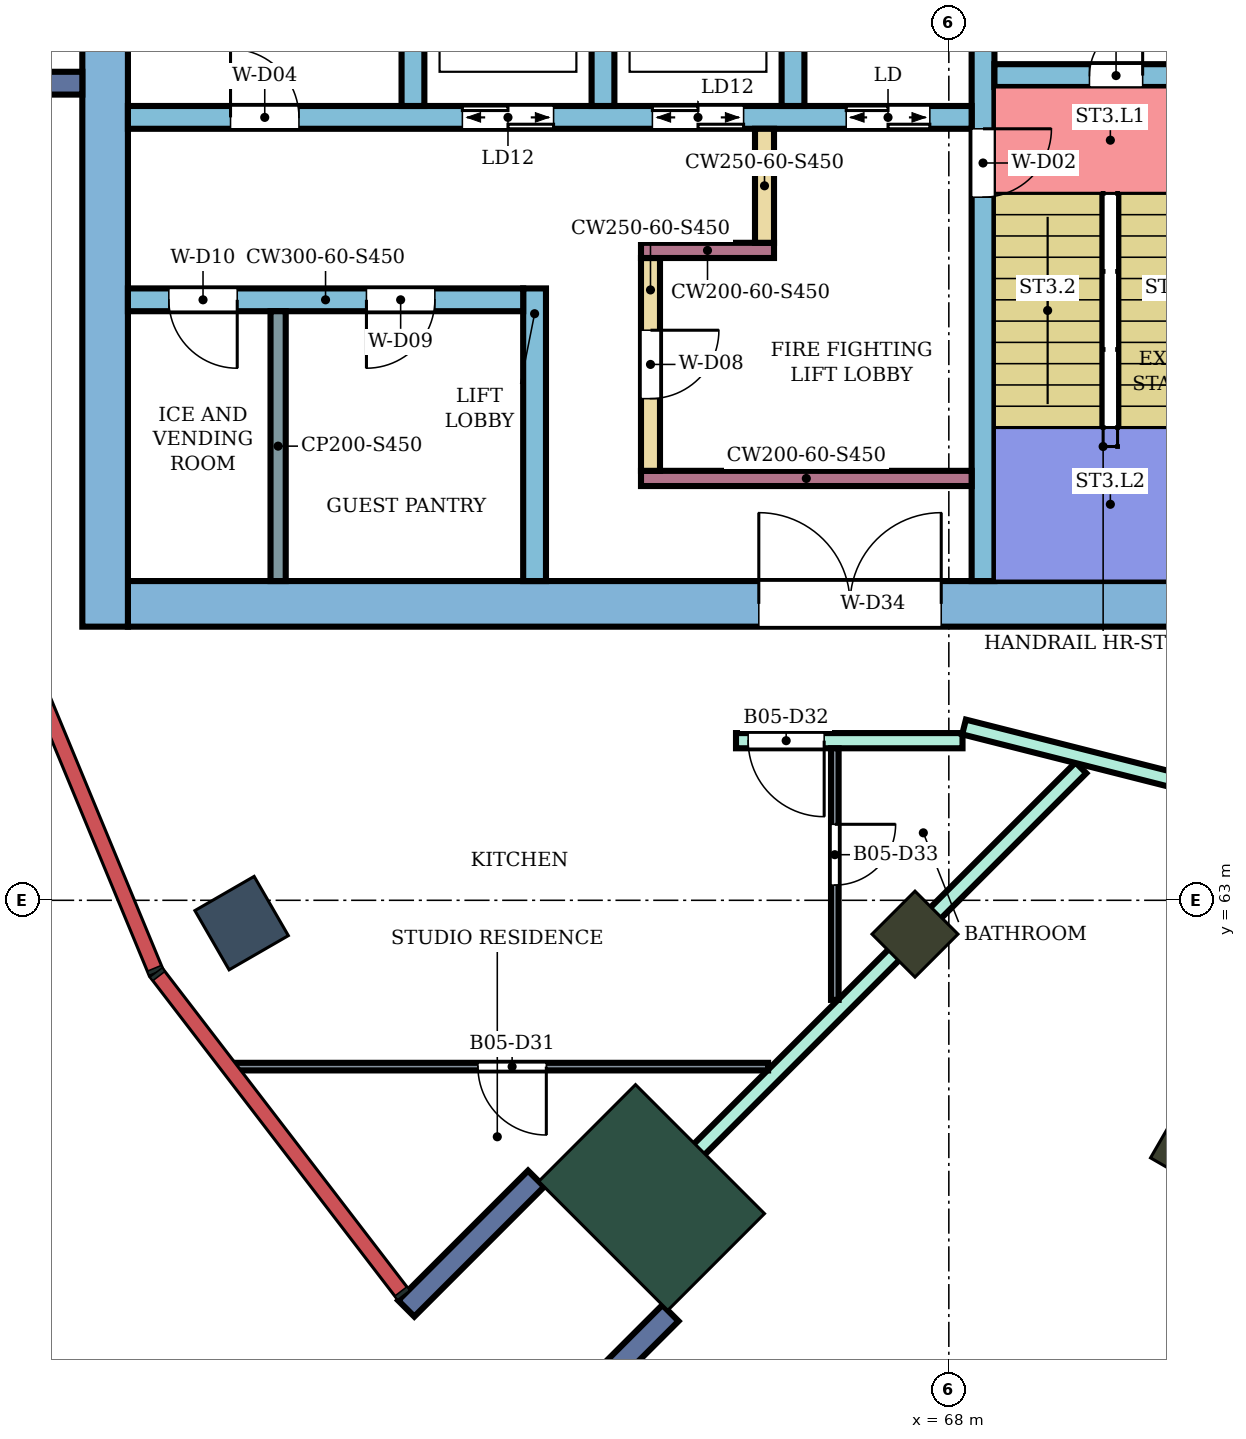
"""IFC4 building model, lengths in metres.
Left out: names, types, materials, properties, quantities, classifications, styles, units other than length and angle.
Written with IfcOpenShell. Run it as: python <this file> out.ifc"""

import sys

from ifc_helpers import new_model, si_unit, direction, frame, frame_2d, origin, origin_2d, place, context, subcontext, project, spatial, rectangle, extrude, element, fill, save


model = new_model("IFC4")
c1 = context("Model", 3, precision=1e-05, world=origin(), true_north=direction((0.0, 1.0)))
c2 = subcontext(c1, "Body", "Model", "MODEL_VIEW")
j1 = project(units=[si_unit("LENGTHUNIT", "METRE"), si_unit("PLANEANGLEUNIT", "RADIAN")], contexts=[c1])
p1 = place(None, origin())
s1 = spatial("IfcSite", under=j1, at=p1, CompositionType="ELEMENT")
p2 = place(p1, origin())
s2 = spatial("IfcBuilding", under=s1, at=p2, CompositionType="ELEMENT")
p3 = place(p2, frame((0.0, 0.0, 266.7)))
s3 = spatial("IfcBuildingStorey", under=s2, at=p3, CompositionType="ELEMENT", Elevation=266.7)
p4 = place(p3, frame((58.696, 62.7, 0.0), z_axis=(0.0, 0.0, 1.0), x_axis=(-0.866025403784, -0.5, 0.0)))
e1 = element("IfcColumn", 1, at=p4, inside=s3, PredefinedType="COLUMN", context=c2, shape_type="SweptSolid", body=[
    extrude(rectangle(XDim=0.9, YDim=0.9, at=origin_2d()), origin(), (0.0, 0.0, 1.0), 4.2),
])
for number, where, z_axis, x_axis in (
    (2, (67.555, 62.555, 0.0), (0.0, 0.0, 1.0), (-0.707, -0.707, 0.0)),
    (3, (71.2, 59.758, 0.0), (0.0, 0.0, 1.0), (-0.5, -0.866, 0.0)),
):
    element("IfcColumn", number, at=place(p3, frame(where, z_axis=z_axis, x_axis=x_axis)), inside=s3, PredefinedType="COLUMN", context=c2, shape_type="SweptSolid", body=[
        extrude(rectangle(XDim=0.8, YDim=0.8, at=origin_2d()), origin(), (0.0, 0.0, 1.0), 4.2),
    ])
p5 = place(p3, frame((64.09, 59.09, 0.0), z_axis=(0.0, 0.0, 1.0), x_axis=(-0.707106781187, -0.707106781187, 0.0)))
e4 = element("IfcColumn", 4, at=p5, inside=s3, PredefinedType="COLUMN", context=c2, shape_type="SweptSolid", body=[
    extrude(rectangle(XDim=1.8, YDim=2.4, at=origin_2d()), origin(), (0.0, 0.0, 1.0), 4.2),
])
p6 = place(p3, frame((72.1, 66.9, 0.0), z_axis=(0.0, 0.0, 1.0), x_axis=(-1.0, 0.0, 0.0)))
e5 = element("IfcWall", 5, at=p6, inside=s3, PredefinedType="SHEAR", context=c2, shape_type="SweptSolid", body=[
    extrude(rectangle(XDim=14.9, YDim=0.6, at=frame_2d((7.45, 0.0))), origin(), (0.0, 0.0, 1.0), 3.75),
])
p7 = place(p6, frame((4.2, 0.0, 0.0)))
e6 = element("IfcOpeningElement", 6, at=p7, cuts=e5, PredefinedType="OPENING", context=c2, shape_type="SweptSolid", body=[
    extrude(rectangle(XDim=2.4, YDim=2.4, at=frame_2d((1.2, 1.2))), frame((0.0, 0.31, 0.0), z_axis=(0.0, -1.0, 0.0), x_axis=(1.0, 0.0, 0.0)), (0.0, 0.0, 1.0), 0.62),
])
p8 = place(p3, frame((56.9, 83.4, 0.0), z_axis=(0.0, 0.0, 1.0), x_axis=(0.0, -1.0, 0.0)))
e7 = element("IfcWall", 7, at=p8, inside=s3, PredefinedType="SHEAR", context=c2, shape_type="SweptSolid", body=[
    extrude(rectangle(XDim=16.8, YDim=0.6, at=frame_2d((8.4, 0.0))), origin(), (0.0, 0.0, 1.0), 3.75),
])
p9 = place(p3, frame((68.45, 75.0, 0.0), z_axis=(0.0, 0.0, 1.0), x_axis=(0.0, -1.0, 0.0)))
e8 = element("IfcWall", 8, at=p9, inside=s3, PredefinedType="SHEAR", context=c2, shape_type="SweptSolid", body=[
    extrude(rectangle(XDim=7.8, YDim=0.3, at=frame_2d((3.9, 0.0))), origin(), (0.0, 0.0, 1.0), 3.75),
])
p10 = place(p9, frame((1.85, 0.0, 0.0)))
e9 = element("IfcOpeningElement", 9, at=p10, cuts=e8, PredefinedType="OPENING", context=c2, shape_type="SweptSolid", body=[
    extrude(rectangle(XDim=0.9, YDim=2.1, at=frame_2d((0.45, 1.05))), frame((0.0, 0.16, 0.0), z_axis=(0.0, -1.0, 0.0), x_axis=(1.0, 0.0, 0.0)), (0.0, 0.0, 1.0), 0.32),
])
p11 = place(p3, frame((71.65, 73.85, 0.0), z_axis=(0.0, 0.0, 1.0), x_axis=(-1.0, 0.0, 0.0)))
e10 = element("IfcWall", 10, at=p11, inside=s3, PredefinedType="SHEAR", context=c2, shape_type="SweptSolid", body=[
    extrude(rectangle(XDim=3.05, YDim=0.3, at=frame_2d((1.525, 0.0))), origin(), (0.0, 0.0, 1.0), 3.75),
])
p12 = place(p11, frame((1.1, 0.0, 0.0)))
e11 = element("IfcOpeningElement", 11, at=p12, cuts=e10, PredefinedType="OPENING", context=c2, shape_type="SweptSolid", body=[
    extrude(rectangle(XDim=0.7, YDim=2.0, at=frame_2d((0.35, 1.0))), frame((0.0, 0.16, 0.0), z_axis=(0.0, -1.0, 0.0), x_axis=(1.0, 0.0, 0.0)), (0.0, 0.0, 1.0), 0.32),
])
p13 = place(p3, frame((68.3, 73.3, 0.0), z_axis=(0.0, 0.0, 1.0), x_axis=(-1.0, 0.0, 0.0)))
e12 = element("IfcWall", 12, at=p13, inside=s3, PredefinedType="SHEAR", context=c2, shape_type="SweptSolid", body=[
    extrude(rectangle(XDim=11.1, YDim=0.3, at=frame_2d((5.55, 0.0))), origin(), (0.0, 0.0, 1.0), 3.75),
])
p14 = place(p13, frame((0.55, 0.0, 0.0)))
e13 = element("IfcOpeningElement", 13, at=p14, cuts=e12, PredefinedType="OPENING", context=c2, shape_type="SweptSolid", body=[
    extrude(rectangle(XDim=1.1, YDim=2.1, at=frame_2d((0.55, 1.05))), frame((0.0, 0.16, 0.0), z_axis=(0.0, -1.0, 0.0), x_axis=(1.0, 0.0, 0.0)), (0.0, 0.0, 1.0), 0.32),
])
p15 = place(p13, frame((3.0, 0.0, 0.0)))
e14 = element("IfcOpeningElement", 14, at=p15, cuts=e12, PredefinedType="OPENING", context=c2, shape_type="SweptSolid", body=[
    extrude(rectangle(XDim=1.2, YDim=2.1, at=frame_2d((0.6, 1.05))), frame((0.0, 0.16, 0.0), z_axis=(0.0, -1.0, 0.0), x_axis=(1.0, 0.0, 0.0)), (0.0, 0.0, 1.0), 0.32),
])
p16 = place(p13, frame((5.5, 0.0, 0.0)))
e15 = element("IfcOpeningElement", 15, at=p16, cuts=e12, PredefinedType="OPENING", context=c2, shape_type="SweptSolid", body=[
    extrude(rectangle(XDim=1.2, YDim=2.1, at=frame_2d((0.6, 1.05))), frame((0.0, 0.16, 0.0), z_axis=(0.0, -1.0, 0.0), x_axis=(1.0, 0.0, 0.0)), (0.0, 0.0, 1.0), 0.32),
])
p17 = place(p13, frame((8.85, 0.0, 0.0)))
e16 = element("IfcOpeningElement", 16, at=p17, cuts=e12, PredefinedType="OPENING", context=c2, shape_type="SweptSolid", body=[
    extrude(rectangle(XDim=0.9, YDim=2.1, at=frame_2d((0.45, 1.05))), frame((0.0, 0.16, 0.0), z_axis=(0.0, -1.0, 0.0), x_axis=(1.0, 0.0, 0.0)), (0.0, 0.0, 1.0), 0.32),
])
for number, where, z_axis, x_axis in (
    (17, (65.95, 76.0, 0.0), (0.0, 0.0, 1.0), (0.0, -1.0, 0.0)),
    (18, (63.45, 76.0, 0.0), (0.0, 0.0, 1.0), (0.0, -1.0, 0.0)),
    (19, (60.95, 76.0, 0.0), (0.0, 0.0, 1.0), (0.0, -1.0, 0.0)),
):
    element("IfcWall", number, at=place(p3, frame(where, z_axis=z_axis, x_axis=x_axis)), inside=s3, PredefinedType="SHEAR", context=c2, shape_type="SweptSolid", body=[
        extrude(rectangle(XDim=2.55, YDim=0.3, at=frame_2d((1.275, 0.0))), origin(), (0.0, 0.0, 1.0), 3.75),
    ])
p18 = place(p3, frame((68.3, 68.55, 0.0), z_axis=(0.0, 0.0, 1.0), x_axis=(-1.0, 0.0, 0.0)))
e20 = element("IfcWall", 20, at=p18, inside=s3, PredefinedType="SHEAR", context=c2, shape_type="SweptSolid", body=[
    extrude(rectangle(XDim=4.35, YDim=0.2, at=frame_2d((2.175, 0.0))), origin(), (0.0, 0.0, 1.0), 3.75),
])
p19 = place(p3, frame((64.075, 71.45, 0.0), z_axis=(0.0, 0.0, 1.0), x_axis=(0.0, -1.0, 0.0)))
e21 = element("IfcWall", 21, at=p19, inside=s3, PredefinedType="SHEAR", context=c2, shape_type="SweptSolid", body=[
    extrude(rectangle(XDim=2.8, YDim=0.25, at=frame_2d((1.4, 0.0))), origin(), (0.0, 0.0, 1.0), 3.75),
])
p20 = place(p19, frame((0.95, 0.0, 0.0)))
e22 = element("IfcOpeningElement", 22, at=p20, cuts=e21, PredefinedType="OPENING", context=c2, shape_type="SweptSolid", body=[
    extrude(rectangle(XDim=0.9, YDim=2.1, at=frame_2d((0.45, 1.05))), frame((0.0, 0.135, 0.0), z_axis=(0.0, -1.0, 0.0), x_axis=(1.0, 0.0, 0.0)), (0.0, 0.0, 1.0), 0.27),
])
p21 = place(p3, frame((65.7, 71.55, 0.0), z_axis=(0.0, 0.0, 1.0), x_axis=(-1.0, 0.0, 0.0)))
e23 = element("IfcWall", 23, at=p21, inside=s3, PredefinedType="SHEAR", context=c2, shape_type="SweptSolid", body=[
    extrude(rectangle(XDim=1.75, YDim=0.2, at=frame_2d((0.875, 0.0))), origin(), (0.0, 0.0, 1.0), 3.75),
])
p22 = place(p3, frame((65.575, 73.15, 0.0), z_axis=(0.0, 0.0, 1.0), x_axis=(0.0, -1.0, 0.0)))
e24 = element("IfcWall", 24, at=p22, inside=s3, PredefinedType="SHEAR", context=c2, shape_type="SweptSolid", body=[
    extrude(rectangle(XDim=1.5, YDim=0.25, at=frame_2d((0.75, 0.0))), origin(), (0.0, 0.0, 1.0), 3.75),
])
p23 = place(p3, frame((62.55, 71.05, 0.0), z_axis=(0.0, 0.0, 1.0), x_axis=(0.0, -1.0, 0.0)))
e25 = element("IfcWall", 25, at=p23, inside=s3, PredefinedType="SHEAR", context=c2, shape_type="SweptSolid", body=[
    extrude(rectangle(XDim=3.85, YDim=0.3, at=frame_2d((1.925, 0.0))), origin(), (0.0, 0.0, 1.0), 3.75),
])
p24 = place(p3, frame((62.4, 70.9, 0.0), z_axis=(0.0, 0.0, 1.0), x_axis=(-1.0, 0.0, 0.0)))
e26 = element("IfcWall", 26, at=p24, inside=s3, PredefinedType="SHEAR", context=c2, shape_type="SweptSolid", body=[
    extrude(rectangle(XDim=5.2, YDim=0.3, at=frame_2d((2.6, 0.0))), origin(), (0.0, 0.0, 1.0), 3.75),
])
p25 = place(p24, frame((1.162, 0.0, 0.0)))
e27 = element("IfcOpeningElement", 27, at=p25, cuts=e26, PredefinedType="OPENING", context=c2, shape_type="SweptSolid", body=[
    extrude(rectangle(XDim=0.9, YDim=2.1, at=frame_2d((0.45, 1.05))), frame((0.0, 0.16, 0.0), z_axis=(0.0, -1.0, 0.0), x_axis=(1.0, 0.0, 0.0)), (0.0, 0.0, 1.0), 0.32),
])
p26 = place(p24, frame((3.762, 0.0, 0.0)))
e28 = element("IfcOpeningElement", 28, at=p26, cuts=e26, PredefinedType="OPENING", context=c2, shape_type="SweptSolid", body=[
    extrude(rectangle(XDim=0.9, YDim=2.1, at=frame_2d((0.45, 1.05))), frame((0.0, 0.16, 0.0), z_axis=(0.0, -1.0, 0.0), x_axis=(1.0, 0.0, 0.0)), (0.0, 0.0, 1.0), 0.32),
])
for number, where, z_axis, x_axis in (
    (29, (56.6, 73.75, 0.0), (0.0, 0.0, 1.0), (-1.0, 0.0, 0.0)),
    (30, (62.57, 59.338, 0.0), (0.0, 0.0, 1.0), (-0.707, -0.707, 0.0)),
    (31, (64.338, 57.57, 0.0), (0.0, 0.0, 1.0), (-0.707, -0.707, 0.0)),
):
    element("IfcWall", number, at=place(p3, frame(where, z_axis=z_axis, x_axis=x_axis)), inside=s3, PredefinedType="NOTDEFINED", context=c2, shape_type="SweptSolid", body=[
        extrude(rectangle(XDim=2.416, YDim=0.3, at=frame_2d((1.208, 0.0))), origin(), (0.0, 0.0, 1.0), 4.2),
    ])
p27 = place(p3, frame((63.592, 58.6, 0.0), z_axis=(0.0, 0.0, 1.0), x_axis=(0.707261286313, 0.706952242293, 0.0)))
e32 = element("IfcWall", 32, at=p27, inside=s3, PredefinedType="PARTITIONING", context=c2, shape_type="SweptSolid", body=[
    extrude(rectangle(XDim=8.69, YDim=0.2, at=frame_2d((4.345, 0.0))), origin(), (0.0, 0.0, 1.0), 3.75),
])
p28 = place(p3, frame((65.2, 65.1, 0.0), z_axis=(0.0, 0.0, 1.0), x_axis=(1.0, 0.0, 0.0)))
e33 = element("IfcWall", 33, at=p28, inside=s3, PredefinedType="PARTITIONING", context=c2, shape_type="SweptSolid", body=[
    extrude(rectangle(XDim=2.98, YDim=0.2, at=frame_2d((1.49, 0.0))), origin(), (0.0, 0.0, 1.0), 3.75),
])
p29 = place(p28, frame((0.16, 0.0, 0.0)))
e34 = element("IfcOpeningElement", 34, at=p29, cuts=e33, PredefinedType="OPENING", context=c2, shape_type="SweptSolid", body=[
    extrude(rectangle(XDim=1.0, YDim=2.1, at=frame_2d((0.5, 1.05))), frame((0.0, 0.11, 0.0), z_axis=(0.0, -1.0, 0.0), x_axis=(1.0, 0.0, 0.0)), (0.0, 0.0, 1.0), 0.22),
])
p30 = place(p3, frame((68.2, 65.28, 0.0), z_axis=(0.0, 0.0, 1.0), x_axis=(0.969428528216, -0.245373854926, 0.0)))
e35 = element("IfcWall", 35, at=p30, inside=s3, PredefinedType="PARTITIONING", context=c2, shape_type="SweptSolid", body=[
    extrude(rectangle(XDim=5.928, YDim=0.2, at=frame_2d((2.964, 0.0))), origin(), (0.0, 0.0, 1.0), 3.75),
])
p31 = place(p30, frame((3.309, 0.0, 0.0)))
e36 = element("IfcOpeningElement", 36, at=p31, cuts=e35, PredefinedType="OPENING", context=c2, shape_type="SweptSolid", body=[
    extrude(rectangle(XDim=1.0, YDim=2.1, at=frame_2d((0.5, 1.05))), frame((0.0, 0.11, 0.0), z_axis=(0.0, -1.0, 0.0), x_axis=(1.0, 0.0, 0.0)), (0.0, 0.0, 1.0), 0.22),
])
p32 = place(p3, frame((58.6, 60.812, 0.0), z_axis=(0.0, 0.0, 1.0), x_axis=(1.0, 0.0, 0.0)))
e37 = element("IfcWall", 37, at=p32, inside=s3, PredefinedType="PARTITIONING", context=c2, shape_type="SweptSolid", body=[
    extrude(rectangle(XDim=7.022, YDim=0.1, at=frame_2d((3.511, 0.0))), origin(), (0.0, 0.0, 1.0), 3.75),
])
p33 = place(p32, frame((3.205, 0.0, 0.0)))
e38 = element("IfcOpeningElement", 38, at=p33, cuts=e37, PredefinedType="OPENING", context=c2, shape_type="SweptSolid", body=[
    extrude(rectangle(XDim=0.9, YDim=2.1, at=frame_2d((0.45, 1.05))), frame((0.0, 0.06, 0.0), z_axis=(0.0, -1.0, 0.0), x_axis=(1.0, 0.0, 0.0)), (0.0, 0.0, 1.0), 0.12),
])
p34 = place(p3, frame((66.5, 61.69, 0.0), z_axis=(0.0, 0.0, 1.0), x_axis=(0.0, 1.0, 0.0)))
e39 = element("IfcWall", 39, at=p34, inside=s3, PredefinedType="PARTITIONING", context=c2, shape_type="SweptSolid", body=[
    extrude(rectangle(XDim=3.31, YDim=0.1, at=frame_2d((1.655, 0.0))), origin(), (0.0, 0.0, 1.0), 3.75),
])
p35 = place(p34, frame((1.51, 0.0, 0.0)))
e40 = element("IfcOpeningElement", 40, at=p35, cuts=e39, PredefinedType="OPENING", context=c2, shape_type="SweptSolid", body=[
    extrude(rectangle(XDim=0.8, YDim=2.1, at=frame_2d((0.4, 1.05))), frame((0.0, 0.06, 0.0), z_axis=(0.0, -1.0, 0.0), x_axis=(1.0, 0.0, 0.0)), (0.0, 0.0, 1.0), 0.12),
])
p36 = place(p3, frame((59.176, 70.75, 0.0), z_axis=(0.0, 0.0, 1.0), x_axis=(0.0, -1.0, 0.0)))
e41 = element("IfcWall", 41, at=p36, inside=s3, PredefinedType="PARTITIONING", context=c2, shape_type="SweptSolid", body=[
    extrude(rectangle(XDim=3.55, YDim=0.2, at=frame_2d((1.775, 0.0))), origin(), (0.0, 0.0, 1.0), 3.75),
])
p37 = place(p33, frame((0.9, 0.0, 0.0), z_axis=(0.0, 0.0, 1.0), x_axis=(-1.0, 0.0, 0.0)))
e42 = element("IfcDoor", 42, at=p37, inside=s3, OperationType="SINGLE_SWING_LEFT", PredefinedType="DOOR", context=c2, shape_type="SweptSolid", body=[
    extrude(rectangle(XDim=0.9, YDim=2.1, at=frame_2d((0.45, 1.05))), frame((0.0, 0.025, 0.0), z_axis=(0.0, -1.0, 0.0), x_axis=(1.0, 0.0, 0.0)), (0.0, 0.0, 1.0), 0.05),
])
fill(e38, e42)
p38 = place(p29, frame((1.0, 0.0, 0.0), z_axis=(0.0, 0.0, 1.0), x_axis=(-1.0, 0.0, 0.0)))
e43 = element("IfcDoor", 43, at=p38, inside=s3, OperationType="SINGLE_SWING_LEFT", PredefinedType="DOOR", context=c2, shape_type="SweptSolid", body=[
    extrude(rectangle(XDim=1.0, YDim=2.1, at=frame_2d((0.5, 1.05))), frame((0.0, 0.025, 0.0), z_axis=(0.0, -1.0, 0.0), x_axis=(1.0, 0.0, 0.0)), (0.0, 0.0, 1.0), 0.05),
])
fill(e34, e43)
p39 = place(p35, frame((0.8, 0.0, 0.0), z_axis=(0.0, 0.0, 1.0), x_axis=(-1.0, 0.0, 0.0)))
e44 = element("IfcDoor", 44, at=p39, inside=s3, OperationType="SINGLE_SWING_LEFT", PredefinedType="DOOR", context=c2, shape_type="SweptSolid", body=[
    extrude(rectangle(XDim=0.8, YDim=2.1, at=frame_2d((0.4, 1.05))), frame((0.0, 0.025, 0.0), z_axis=(0.0, -1.0, 0.0), x_axis=(1.0, 0.0, 0.0)), (0.0, 0.0, 1.0), 0.05),
])
fill(e40, e44)
p40 = place(p12, frame((0.7, 0.0, 0.0), z_axis=(0.0, 0.0, 1.0), x_axis=(-1.0, 0.0, 0.0)))
e45 = element("IfcDoor", 45, at=p40, inside=s3, OperationType="SINGLE_SWING_RIGHT", PredefinedType="DOOR", context=c2, shape_type="SweptSolid", body=[
    extrude(rectangle(XDim=0.7, YDim=2.0, at=frame_2d((0.35, 1.0))), frame((0.0, 0.025, 0.0), z_axis=(0.0, -1.0, 0.0), x_axis=(1.0, 0.0, 0.0)), (0.0, 0.0, 1.0), 0.05),
])
fill(e11, e45)
p41 = place(p10, origin())
e46 = element("IfcDoor", 46, at=p41, inside=s3, OperationType="SINGLE_SWING_LEFT", PredefinedType="DOOR", context=c2, shape_type="SweptSolid", body=[
    extrude(rectangle(XDim=0.9, YDim=2.1, at=frame_2d((0.45, 1.05))), frame((0.0, 0.025, 0.0), z_axis=(0.0, -1.0, 0.0), x_axis=(1.0, 0.0, 0.0)), (0.0, 0.0, 1.0), 0.05),
])
fill(e9, e46)
p42 = place(p14, origin())
e47 = element("IfcDoor", 47, at=p42, inside=s3, OperationType="DOUBLE_DOOR_SLIDING", PredefinedType="DOOR", context=c2, shape_type="SweptSolid", body=[
    extrude(rectangle(XDim=1.1, YDim=2.1, at=frame_2d((0.55, 1.05))), frame((0.0, 0.025, 0.0), z_axis=(0.0, -1.0, 0.0), x_axis=(1.0, 0.0, 0.0)), (0.0, 0.0, 1.0), 0.05),
])
fill(e13, e47)
p43 = place(p15, origin())
e48 = element("IfcDoor", 48, at=p43, inside=s3, OperationType="DOUBLE_DOOR_SLIDING", PredefinedType="DOOR", context=c2, shape_type="SweptSolid", body=[
    extrude(rectangle(XDim=1.2, YDim=2.1, at=frame_2d((0.6, 1.05))), frame((0.0, 0.025, 0.0), z_axis=(0.0, -1.0, 0.0), x_axis=(1.0, 0.0, 0.0)), (0.0, 0.0, 1.0), 0.05),
])
fill(e14, e48)
p44 = place(p16, origin())
e49 = element("IfcDoor", 49, at=p44, inside=s3, OperationType="DOUBLE_DOOR_SLIDING", PredefinedType="DOOR", context=c2, shape_type="SweptSolid", body=[
    extrude(rectangle(XDim=1.2, YDim=2.1, at=frame_2d((0.6, 1.05))), frame((0.0, 0.025, 0.0), z_axis=(0.0, -1.0, 0.0), x_axis=(1.0, 0.0, 0.0)), (0.0, 0.0, 1.0), 0.05),
])
fill(e15, e49)
p45 = place(p17, frame((0.9, 0.0, 0.0), z_axis=(0.0, 0.0, 1.0), x_axis=(-1.0, 0.0, 0.0)))
e50 = element("IfcDoor", 50, at=p45, inside=s3, OperationType="SINGLE_SWING_LEFT", PredefinedType="DOOR", context=c2, shape_type="SweptSolid", body=[
    extrude(rectangle(XDim=0.9, YDim=2.1, at=frame_2d((0.45, 1.05))), frame((0.0, 0.025, 0.0), z_axis=(0.0, -1.0, 0.0), x_axis=(1.0, 0.0, 0.0)), (0.0, 0.0, 1.0), 0.05),
])
fill(e16, e50)
p46 = place(p20, origin())
e51 = element("IfcDoor", 51, at=p46, inside=s3, OperationType="SINGLE_SWING_LEFT", PredefinedType="DOOR", context=c2, shape_type="SweptSolid", body=[
    extrude(rectangle(XDim=0.9, YDim=2.1, at=frame_2d((0.45, 1.05))), frame((0.0, 0.025, 0.0), z_axis=(0.0, -1.0, 0.0), x_axis=(1.0, 0.0, 0.0)), (0.0, 0.0, 1.0), 0.05),
])
fill(e22, e51)
p47 = place(p25, origin())
e52 = element("IfcDoor", 52, at=p47, inside=s3, OperationType="SINGLE_SWING_RIGHT", PredefinedType="DOOR", context=c2, shape_type="SweptSolid", body=[
    extrude(rectangle(XDim=0.9, YDim=2.1, at=frame_2d((0.45, 1.05))), frame((0.0, 0.025, 0.0), z_axis=(0.0, -1.0, 0.0), x_axis=(1.0, 0.0, 0.0)), (0.0, 0.0, 1.0), 0.05),
])
fill(e27, e52)
p48 = place(p26, origin())
e53 = element("IfcDoor", 53, at=p48, inside=s3, OperationType="SINGLE_SWING_LEFT", PredefinedType="DOOR", context=c2, shape_type="SweptSolid", body=[
    extrude(rectangle(XDim=0.9, YDim=2.1, at=frame_2d((0.45, 1.05))), frame((0.0, 0.025, 0.0), z_axis=(0.0, -1.0, 0.0), x_axis=(1.0, 0.0, 0.0)), (0.0, 0.0, 1.0), 0.05),
])
fill(e28, e53)
p49 = place(p7, frame((2.4, 0.0, 0.0), z_axis=(0.0, 0.0, 1.0), x_axis=(-1.0, 0.0, 0.0)))
e54 = element("IfcDoor", 54, at=p49, inside=s3, OperationType="DOUBLE_DOOR_SINGLE_SWING", PredefinedType="DOOR", context=c2, shape_type="SweptSolid", body=[
    extrude(rectangle(XDim=2.4, YDim=2.4, at=frame_2d((1.2, 1.2))), frame((0.0, 0.025, 0.0), z_axis=(0.0, -1.0, 0.0), x_axis=(1.0, 0.0, 0.0)), (0.0, 0.0, 1.0), 0.05),
])
fill(e6, e54)
save(model, sys.argv[1])
